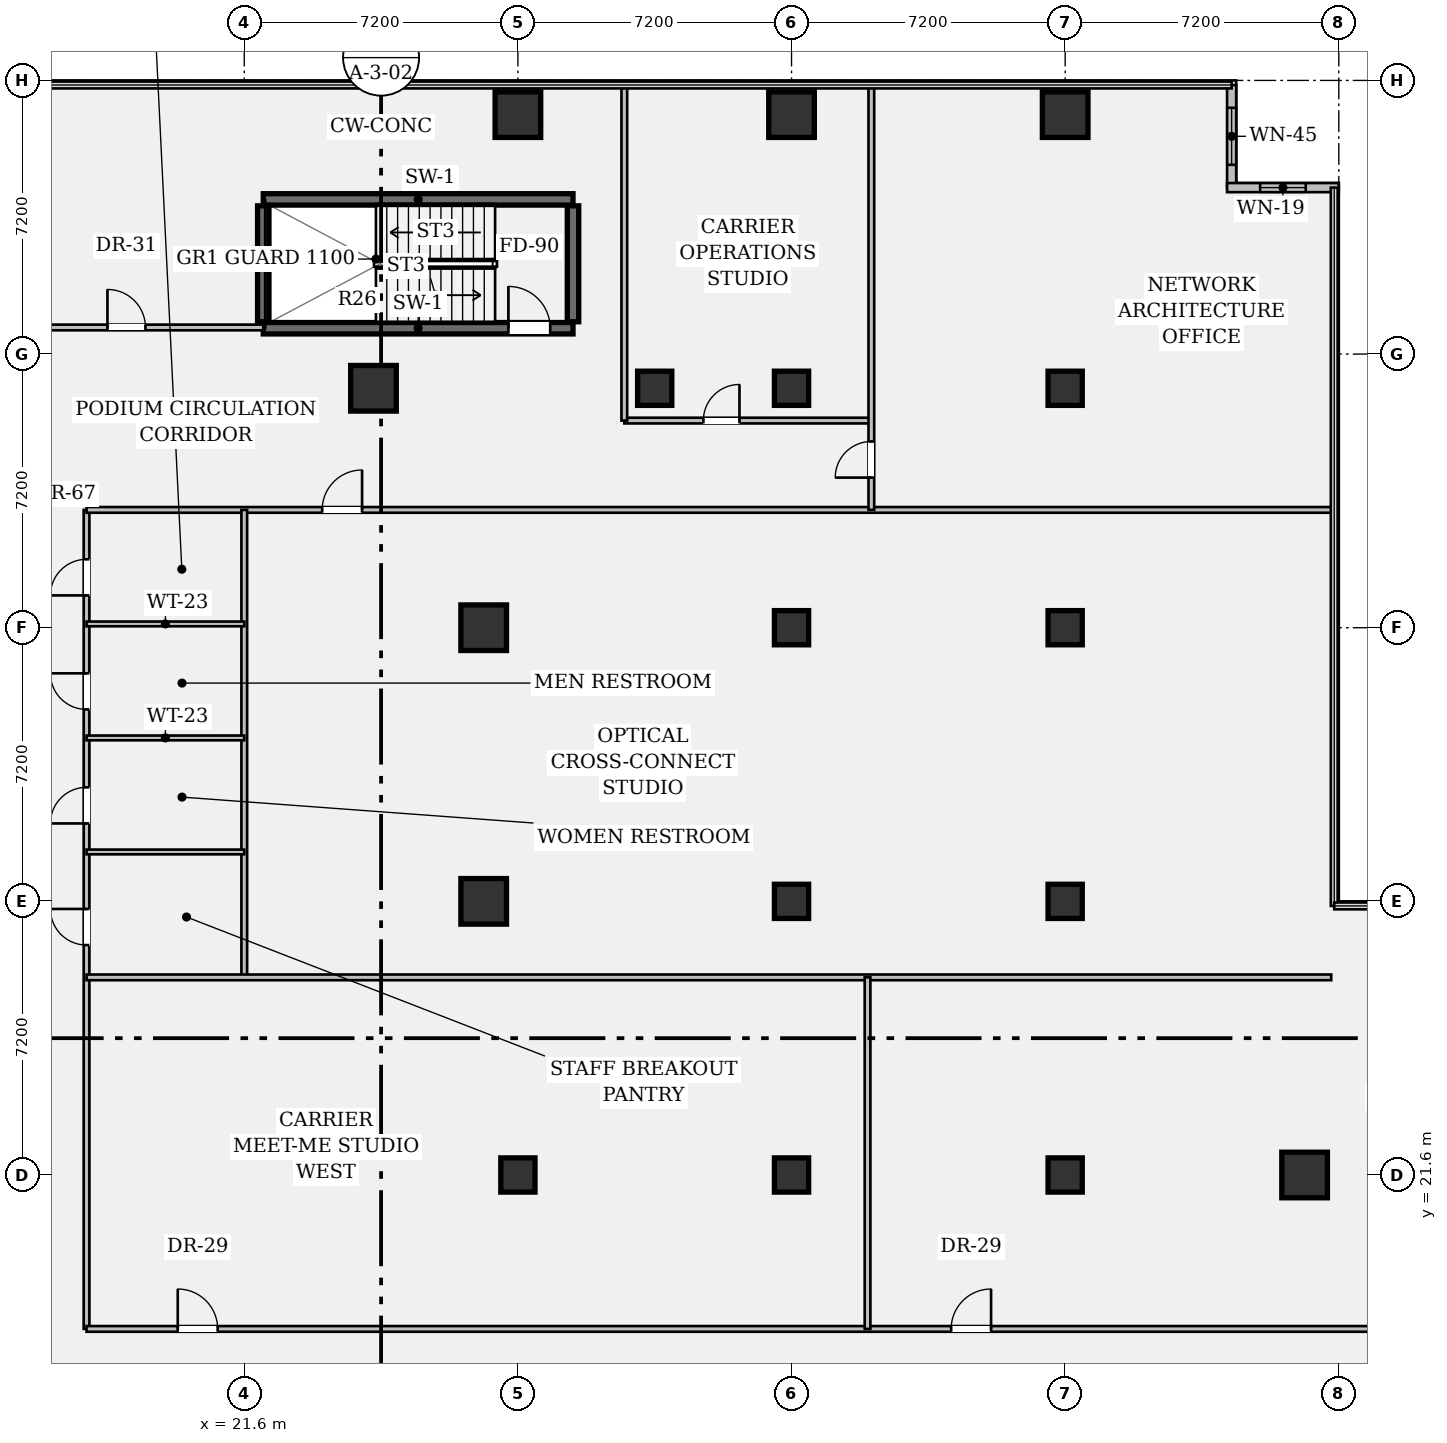
"""IFC4 building model, lengths in metres.
Left out: names, types, materials, properties, quantities, classifications, styles, units other than length and angle.
Written with IfcOpenShell. Run it as: python <this file> out.ifc"""

import sys

from ifc_helpers import new_model, si_unit, direction, frame, frame_2d, origin, origin_2d, place, context, subcontext, project, spatial, rectangle, hollow_rectangle, extrude, element, fill, save


model = new_model("IFC4")
c1 = context("Model", 3, precision=1e-05, world=origin(), true_north=direction((0.0, 1.0)))
c2 = subcontext(c1, "Body", "Model", "MODEL_VIEW")
j1 = project(units=[si_unit("LENGTHUNIT", "METRE"), si_unit("PLANEANGLEUNIT", "RADIAN")], contexts=[c1])
p1 = place(None, origin())
s1 = spatial("IfcSite", under=j1, at=p1, CompositionType="ELEMENT")
p2 = place(p1, origin())
s2 = spatial("IfcBuilding", under=s1, at=p2, CompositionType="ELEMENT")
p3 = place(p2, frame((0.0, 0.0, 9.45)))
s3 = spatial("IfcBuildingStorey", under=s2, at=p3, CompositionType="ELEMENT", Elevation=9.45)
p4 = place(p3, frame((22.1, 43.88, 0.0), z_axis=(0.0, 0.0, 1.0), x_axis=(1.0, 0.0, 0.0)))
e1 = element("IfcWall", 1, at=p4, inside=s3, PredefinedType="SHEAR", context=c2, shape_type="SweptSolid", body=[
    extrude(rectangle(XDim=8.15, YDim=0.3, at=frame_2d((4.075, 0.0))), origin(), (0.0, 0.0, 1.0), 3.9),
])
p5 = place(p4, frame((6.45, 0.0, 0.0)))
e2 = element("IfcOpeningElement", 2, at=p5, cuts=e1, PredefinedType="OPENING", context=c2, shape_type="SweptSolid", body=[
    extrude(rectangle(XDim=1.1, YDim=2.15, at=frame_2d((0.55, 1.075))), frame((0.0, 0.162, 0.0), z_axis=(0.0, -1.0, 0.0), x_axis=(1.0, 0.0, 0.0)), (0.0, 0.0, 1.0), 0.324),
])
p6 = place(p3, frame((22.1, 47.27, 0.0), z_axis=(0.0, 0.0, 1.0), x_axis=(1.0, 0.0, 0.0)))
e3 = element("IfcWall", 3, at=p6, inside=s3, PredefinedType="SHEAR", context=c2, shape_type="SweptSolid", body=[
    extrude(rectangle(XDim=8.15, YDim=0.3, at=frame_2d((4.075, 0.0))), origin(), (0.0, 0.0, 1.0), 3.9),
])
for number, where, z_axis, x_axis in (
    (4, (22.1, 44.05, 0.0), (0.0, 0.0, 1.0), (0.0, 1.0, 0.0)),
    (5, (30.25, 44.05, 0.0), (0.0, 0.0, 1.0), (0.0, 1.0, 0.0)),
):
    element("IfcWall", number, at=place(p3, frame(where, z_axis=z_axis, x_axis=x_axis)), inside=s3, PredefinedType="SHEAR", context=c2, shape_type="SweptSolid", body=[
        extrude(rectangle(XDim=3.05, YDim=0.3, at=frame_2d((1.525, 0.0))), origin(), (0.0, 0.0, 1.0), 3.9),
    ])
for number, where, z_axis, x_axis in (
    (6, (25.0, 42.3, 0.0), (0.0, 0.0, 1.0), (1.0, 0.0, 0.0)),
    (7, (27.9, 28.8, 0.0), (0.0, 0.0, 1.0), (1.0, 0.0, 0.0)),
    (8, (27.9, 36.0, 0.0), (0.0, 0.0, 1.0), (1.0, 0.0, 0.0)),
):
    element("IfcColumn", number, at=place(p3, frame(where, z_axis=z_axis, x_axis=x_axis)), inside=s3, PredefinedType="COLUMN", context=c2, shape_type="SweptSolid", body=[
        extrude(hollow_rectangle(XDim=1.2, YDim=1.2, WallThickness=0.075, at=origin_2d()), origin(), (0.0, 0.0, 1.0), 3.9),
    ])
p7 = place(p3, frame((28.8, 21.6, 0.0), z_axis=(0.0, 0.0, 1.0), x_axis=(1.0, 0.0, 0.0)))
e9 = element("IfcColumn", 9, at=p7, inside=s3, PredefinedType="COLUMN", context=c2, shape_type="SweptSolid", body=[
    extrude(rectangle(XDim=0.9, YDim=0.9, at=origin_2d()), origin(), (0.0, 0.0, 1.0), 3.9),
])
p8 = place(p3, frame((28.8, 49.5, 0.0), z_axis=(0.0, 0.0, 1.0), x_axis=(1.0, 0.0, 0.0)))
e10 = element("IfcColumn", 10, at=p8, inside=s3, PredefinedType="COLUMN", context=c2, shape_type="SweptSolid", body=[
    extrude(hollow_rectangle(XDim=1.2, YDim=1.2, WallThickness=0.075, at=origin_2d()), origin(), (0.0, 0.0, 1.0), 3.9),
])
for number, where, z_axis, x_axis in (
    (11, (32.4, 42.3, 0.0), (0.0, 0.0, 1.0), (1.0, 0.0, 0.0)),
    (12, (36.0, 21.6, 0.0), (0.0, 0.0, 1.0), (1.0, 0.0, 0.0)),
    (13, (36.0, 28.8, 0.0), (0.0, 0.0, 1.0), (1.0, 0.0, 0.0)),
    (14, (36.0, 36.0, 0.0), (0.0, 0.0, 1.0), (1.0, 0.0, 0.0)),
    (15, (36.0, 42.3, 0.0), (0.0, 0.0, 1.0), (1.0, 0.0, 0.0)),
):
    element("IfcColumn", number, at=place(p3, frame(where, z_axis=z_axis, x_axis=x_axis)), inside=s3, PredefinedType="COLUMN", context=c2, shape_type="SweptSolid", body=[
        extrude(rectangle(XDim=0.9, YDim=0.9, at=origin_2d()), origin(), (0.0, 0.0, 1.0), 3.9),
    ])
p9 = place(p3, frame((36.0, 49.5, 0.0), z_axis=(0.0, 0.0, 1.0), x_axis=(1.0, 0.0, 0.0)))
e16 = element("IfcColumn", 16, at=p9, inside=s3, PredefinedType="COLUMN", context=c2, shape_type="SweptSolid", body=[
    extrude(hollow_rectangle(XDim=1.2, YDim=1.2, WallThickness=0.075, at=origin_2d()), origin(), (0.0, 0.0, 1.0), 3.9),
])
for number, where, z_axis, x_axis in (
    (17, (43.2, 21.6, 0.0), (0.0, 0.0, 1.0), (1.0, 0.0, 0.0)),
    (18, (43.2, 28.8, 0.0), (0.0, 0.0, 1.0), (1.0, 0.0, 0.0)),
    (19, (43.2, 36.0, 0.0), (0.0, 0.0, 1.0), (1.0, 0.0, 0.0)),
    (20, (43.2, 42.3, 0.0), (0.0, 0.0, 1.0), (1.0, 0.0, 0.0)),
):
    element("IfcColumn", number, at=place(p3, frame(where, z_axis=z_axis, x_axis=x_axis)), inside=s3, PredefinedType="COLUMN", context=c2, shape_type="SweptSolid", body=[
        extrude(rectangle(XDim=0.9, YDim=0.9, at=origin_2d()), origin(), (0.0, 0.0, 1.0), 3.9),
    ])
for number, where, z_axis, x_axis in (
    (21, (43.2, 49.5, 0.0), (0.0, 0.0, 1.0), (1.0, 0.0, 0.0)),
    (22, (49.5, 21.6, 0.0), (0.0, 0.0, 1.0), (1.0, 0.0, 0.0)),
):
    element("IfcColumn", number, at=place(p3, frame(where, z_axis=z_axis, x_axis=x_axis)), inside=s3, PredefinedType="COLUMN", context=c2, shape_type="SweptSolid", body=[
        extrude(hollow_rectangle(XDim=1.2, YDim=1.2, WallThickness=0.075, at=origin_2d()), origin(), (0.0, 0.0, 1.0), 3.9),
    ])
p10 = place(p3, frame((47.58, 50.28, 0.0), z_axis=(0.0, 0.0, 1.0), x_axis=(0.0, -1.0, 0.0)))
e23 = element("IfcWall", 23, at=p10, inside=s3, PredefinedType="STANDARD", context=c2, shape_type="SweptSolid", body=[
    extrude(rectangle(XDim=2.7, YDim=0.24, at=frame_2d((1.35, 0.0))), origin(), (0.0, 0.0, 1.0), 3.9),
])
p11 = place(p10, frame((0.6, 0.0, 0.95)))
e24 = element("IfcOpeningElement", 24, at=p11, cuts=e23, PredefinedType="OPENING", context=c2, shape_type="SweptSolid", body=[
    extrude(rectangle(XDim=1.5, YDim=1.8, at=frame_2d((0.75, 0.9))), frame((0.0, 0.132, 0.0), z_axis=(0.0, -1.0, 0.0), x_axis=(1.0, 0.0, 0.0)), (0.0, 0.0, 1.0), 0.264),
])
p12 = place(p3, frame((47.46, 47.58, 0.0), z_axis=(0.0, 0.0, 1.0), x_axis=(1.0, 0.0, 0.0)))
e25 = element("IfcWall", 25, at=p12, inside=s3, PredefinedType="STANDARD", context=c2, shape_type="SweptSolid", body=[
    extrude(rectangle(XDim=2.94, YDim=0.24, at=frame_2d((1.47, 0.0))), origin(), (0.0, 0.0, 1.0), 3.9),
])
p13 = place(p12, frame((0.87, 0.0, 0.95)))
e26 = element("IfcOpeningElement", 26, at=p13, cuts=e25, PredefinedType="OPENING", context=c2, shape_type="SweptSolid", body=[
    extrude(rectangle(XDim=1.2, YDim=1.8, at=frame_2d((0.6, 0.9))), frame((0.0, 0.132, 0.0), z_axis=(0.0, -1.0, 0.0), x_axis=(1.0, 0.0, 0.0)), (0.0, 0.0, 1.0), 0.264),
])
p14 = place(p3, frame((17.45, 17.55, 0.0), z_axis=(0.0, 0.0, 1.0), x_axis=(0.0, 1.0, 0.0)))
e27 = element("IfcWall", 27, at=p14, inside=s3, PredefinedType="PARTITIONING", context=c2, shape_type="SweptSolid", body=[
    extrude(rectangle(XDim=21.55, YDim=0.15, at=frame_2d((10.775, 0.0))), origin(), (0.0, 0.0, 1.0), 2.938),
])
p15 = place(p14, frame((19.3, 0.0, 0.0)))
e28 = element("IfcOpeningElement", 28, at=p15, cuts=e27, PredefinedType="OPENING", context=c2, shape_type="SweptSolid", body=[
    extrude(rectangle(XDim=0.95, YDim=2.15, at=frame_2d((0.475, 1.075))), frame((0.0, 0.087, 0.0), z_axis=(0.0, -1.0, 0.0), x_axis=(1.0, 0.0, 0.0)), (0.0, 0.0, 1.0), 0.174),
])
p16 = place(p14, frame((16.3, 0.0, 0.0)))
e29 = element("IfcOpeningElement", 29, at=p16, cuts=e27, PredefinedType="OPENING", context=c2, shape_type="SweptSolid", body=[
    extrude(rectangle(XDim=0.95, YDim=2.15, at=frame_2d((0.475, 1.075))), frame((0.0, 0.087, 0.0), z_axis=(0.0, -1.0, 0.0), x_axis=(1.0, 0.0, 0.0)), (0.0, 0.0, 1.0), 0.174),
])
p17 = place(p14, frame((13.3, 0.0, 0.0)))
e30 = element("IfcOpeningElement", 30, at=p17, cuts=e27, PredefinedType="OPENING", context=c2, shape_type="SweptSolid", body=[
    extrude(rectangle(XDim=0.95, YDim=2.15, at=frame_2d((0.475, 1.075))), frame((0.0, 0.087, 0.0), z_axis=(0.0, -1.0, 0.0), x_axis=(1.0, 0.0, 0.0)), (0.0, 0.0, 1.0), 0.174),
])
p18 = place(p14, frame((10.1, 0.0, 0.0)))
e31 = element("IfcOpeningElement", 31, at=p18, cuts=e27, PredefinedType="OPENING", context=c2, shape_type="SweptSolid", body=[
    extrude(rectangle(XDim=0.95, YDim=2.15, at=frame_2d((0.475, 1.075))), frame((0.0, 0.087, 0.0), z_axis=(0.0, -1.0, 0.0), x_axis=(1.0, 0.0, 0.0)), (0.0, 0.0, 1.0), 0.174),
])
p19 = place(p3, frame((14.4, 43.9, 0.0), z_axis=(0.0, 0.0, 1.0), x_axis=(1.0, 0.0, 0.0)))
e32 = element("IfcWall", 32, at=p19, inside=s3, PredefinedType="PARTITIONING", context=c2, shape_type="SweptSolid", body=[
    extrude(rectangle(XDim=7.7, YDim=0.15, at=frame_2d((3.85, 0.0))), origin(), (0.0, 0.0, 1.0), 2.938),
])
p20 = place(p19, frame((3.6, 0.0, 0.0)))
e33 = element("IfcOpeningElement", 33, at=p20, cuts=e32, PredefinedType="OPENING", context=c2, shape_type="SweptSolid", body=[
    extrude(rectangle(XDim=1.0, YDim=2.15, at=frame_2d((0.5, 1.075))), frame((0.0, 0.087, 0.0), z_axis=(0.0, -1.0, 0.0), x_axis=(1.0, 0.0, 0.0)), (0.0, 0.0, 1.0), 0.174),
])
p21 = place(p3, frame((31.6, 41.45, 0.0), z_axis=(0.0, 0.0, 1.0), x_axis=(1.0, 0.0, 0.0)))
e34 = element("IfcWall", 34, at=p21, inside=s3, PredefinedType="PARTITIONING", context=c2, shape_type="SweptSolid", body=[
    extrude(rectangle(XDim=6.5, YDim=0.15, at=frame_2d((3.25, 0.0))), origin(), (0.0, 0.0, 1.0), 2.938),
])
p22 = place(p21, frame((2.08, 0.0, 0.0)))
e35 = element("IfcOpeningElement", 35, at=p22, cuts=e34, PredefinedType="OPENING", context=c2, shape_type="SweptSolid", body=[
    extrude(rectangle(XDim=0.95, YDim=2.15, at=frame_2d((0.475, 1.075))), frame((0.0, 0.087, 0.0), z_axis=(0.0, -1.0, 0.0), x_axis=(1.0, 0.0, 0.0)), (0.0, 0.0, 1.0), 0.174),
])
p23 = place(p3, frame((17.45, 39.1, 0.0), z_axis=(0.0, 0.0, 1.0), x_axis=(1.0, 0.0, 0.0)))
e36 = element("IfcWall", 36, at=p23, inside=s3, PredefinedType="PARTITIONING", context=c2, shape_type="SweptSolid", body=[
    extrude(rectangle(XDim=32.83, YDim=0.15, at=frame_2d((16.415, 0.0))), origin(), (0.0, 0.0, 1.0), 2.938),
])
p24 = place(p23, frame((6.2, 0.0, 0.0)))
e37 = element("IfcOpeningElement", 37, at=p24, cuts=e36, PredefinedType="OPENING", context=c2, shape_type="SweptSolid", body=[
    extrude(rectangle(XDim=1.05, YDim=2.15, at=frame_2d((0.525, 1.075))), frame((0.0, 0.087, 0.0), z_axis=(0.0, -1.0, 0.0), x_axis=(1.0, 0.0, 0.0)), (0.0, 0.0, 1.0), 0.174),
])
p25 = place(p3, frame((31.6, 41.45, 0.0), z_axis=(0.0, 0.0, 1.0), x_axis=(0.0, 1.0, 0.0)))
e38 = element("IfcWall", 38, at=p25, inside=s3, PredefinedType="PARTITIONING", context=c2, shape_type="SweptSolid", body=[
    extrude(rectangle(XDim=8.83, YDim=0.15, at=frame_2d((4.415, 0.0))), origin(), (0.0, 0.0, 1.0), 2.938),
])
p26 = place(p3, frame((38.1, 39.1, 0.0), z_axis=(0.0, 0.0, 1.0), x_axis=(0.0, 1.0, 0.0)))
e39 = element("IfcWall", 39, at=p26, inside=s3, PredefinedType="PARTITIONING", context=c2, shape_type="SweptSolid", body=[
    extrude(rectangle(XDim=11.18, YDim=0.15, at=frame_2d((5.59, 0.0))), origin(), (0.0, 0.0, 1.0), 2.938),
])
p27 = place(p26, frame((0.85, 0.0, 0.0)))
e40 = element("IfcOpeningElement", 40, at=p27, cuts=e39, PredefinedType="OPENING", context=c2, shape_type="SweptSolid", body=[
    extrude(rectangle(XDim=0.95, YDim=2.15, at=frame_2d((0.475, 1.075))), frame((0.0, 0.087, 0.0), z_axis=(0.0, -1.0, 0.0), x_axis=(1.0, 0.0, 0.0)), (0.0, 0.0, 1.0), 0.174),
])
p28 = place(p3, frame((17.45, 17.55, 0.0), z_axis=(0.0, 0.0, 1.0), x_axis=(1.0, 0.0, 0.0)))
e41 = element("IfcWall", 41, at=p28, inside=s3, PredefinedType="PARTITIONING", context=c2, shape_type="SweptSolid", body=[
    extrude(rectangle(XDim=68.83, YDim=0.15, at=frame_2d((34.415, 0.0))), origin(), (0.0, 0.0, 1.0), 2.938),
])
p29 = place(p28, frame((2.4, 0.0, 0.0)))
e42 = element("IfcOpeningElement", 42, at=p29, cuts=e41, PredefinedType="OPENING", context=c2, shape_type="SweptSolid", body=[
    extrude(rectangle(XDim=1.05, YDim=2.15, at=frame_2d((0.525, 1.075))), frame((0.0, 0.087, 0.0), z_axis=(0.0, -1.0, 0.0), x_axis=(1.0, 0.0, 0.0)), (0.0, 0.0, 1.0), 0.174),
])
p30 = place(p28, frame((22.75, 0.0, 0.0)))
e43 = element("IfcOpeningElement", 43, at=p30, cuts=e41, PredefinedType="OPENING", context=c2, shape_type="SweptSolid", body=[
    extrude(rectangle(XDim=1.05, YDim=2.15, at=frame_2d((0.525, 1.075))), frame((0.0, 0.087, 0.0), z_axis=(0.0, -1.0, 0.0), x_axis=(1.0, 0.0, 0.0)), (0.0, 0.0, 1.0), 0.174),
])
p31 = place(p28, frame((46.75, 0.0, 0.0)))
e44 = element("IfcOpeningElement", 44, at=p31, cuts=e41, PredefinedType="OPENING", context=c2, shape_type="SweptSolid", body=[
    extrude(rectangle(XDim=1.05, YDim=2.15, at=frame_2d((0.525, 1.075))), frame((0.0, 0.087, 0.0), z_axis=(0.0, -1.0, 0.0), x_axis=(1.0, 0.0, 0.0)), (0.0, 0.0, 1.0), 0.174),
])
p32 = place(p3, frame((21.6, 26.8, 0.0), z_axis=(0.0, 0.0, 1.0), x_axis=(0.0, 1.0, 0.0)))
e45 = element("IfcWall", 45, at=p32, inside=s3, PredefinedType="PARTITIONING", context=c2, shape_type="SweptSolid", body=[
    extrude(rectangle(XDim=12.3, YDim=0.15, at=frame_2d((6.15, 0.0))), origin(), (0.0, 0.0, 1.0), 2.938),
])
p33 = place(p3, frame((17.45, 36.1, 0.0), z_axis=(0.0, 0.0, 1.0), x_axis=(1.0, 0.0, 0.0)))
e46 = element("IfcWall", 46, at=p33, inside=s3, PredefinedType="PARTITIONING", context=c2, shape_type="SweptSolid", body=[
    extrude(rectangle(XDim=4.15, YDim=0.125, at=frame_2d((2.075, 0.0))), origin(), (0.0, 0.0, 1.0), 2.938),
])
for number, where, z_axis, x_axis in (
    (47, (17.45, 33.1, 0.0), (0.0, 0.0, 1.0), (1.0, 0.0, 0.0)),
    (48, (17.45, 30.1, 0.0), (0.0, 0.0, 1.0), (1.0, 0.0, 0.0)),
):
    element("IfcWall", number, at=place(p3, frame(where, z_axis=z_axis, x_axis=x_axis)), inside=s3, PredefinedType="PARTITIONING", context=c2, shape_type="SweptSolid", body=[
        extrude(rectangle(XDim=4.15, YDim=0.125, at=frame_2d((2.075, 0.0))), origin(), (0.0, 0.0, 1.0), 3.336),
    ])
p34 = place(p3, frame((17.45, 26.8, 0.0), z_axis=(0.0, 0.0, 1.0), x_axis=(1.0, 0.0, 0.0)))
e49 = element("IfcWall", 49, at=p34, inside=s3, PredefinedType="PARTITIONING", context=c2, shape_type="SweptSolid", body=[
    extrude(rectangle(XDim=32.75, YDim=0.15, at=frame_2d((16.375, 0.0))), origin(), (0.0, 0.0, 1.0), 2.938),
])
p35 = place(p3, frame((38.0, 17.55, 0.0), z_axis=(0.0, 0.0, 1.0), x_axis=(0.0, 1.0, 0.0)))
e50 = element("IfcWall", 50, at=p35, inside=s3, PredefinedType="PARTITIONING", context=c2, shape_type="SweptSolid", body=[
    extrude(rectangle(XDim=9.25, YDim=0.15, at=frame_2d((4.625, 0.0))), origin(), (0.0, 0.0, 1.0), 2.938),
])
p36 = place(p11, origin())
e51 = element("IfcWindow", 51, at=p36, inside=s3, PartitioningType="SINGLE_PANEL", PredefinedType="WINDOW", context=c2, shape_type="SweptSolid", body=[
    extrude(rectangle(XDim=1.5, YDim=1.8, at=frame_2d((0.75, 0.9))), frame((0.0, 0.03, 0.0), z_axis=(0.0, -1.0, 0.0), x_axis=(1.0, 0.0, 0.0)), (0.0, 0.0, 1.0), 0.06),
])
fill(e24, e51)
p37 = place(p13, origin())
e52 = element("IfcWindow", 52, at=p37, inside=s3, PartitioningType="SINGLE_PANEL", PredefinedType="WINDOW", context=c2, shape_type="SweptSolid", body=[
    extrude(rectangle(XDim=1.2, YDim=1.8, at=frame_2d((0.6, 0.9))), frame((0.0, 0.03, 0.0), z_axis=(0.0, -1.0, 0.0), x_axis=(1.0, 0.0, 0.0)), (0.0, 0.0, 1.0), 0.06),
])
fill(e26, e52)
p38 = place(p5, origin())
e53 = element("IfcDoor", 53, at=p38, inside=s3, OperationType="SINGLE_SWING_LEFT", PredefinedType="DOOR", context=c2, shape_type="SweptSolid", body=[
    extrude(rectangle(XDim=1.1, YDim=2.15, at=frame_2d((0.55, 1.075))), frame((0.0, 0.025, 0.0), z_axis=(0.0, -1.0, 0.0), x_axis=(1.0, 0.0, 0.0)), (0.0, 0.0, 1.0), 0.05),
])
fill(e2, e53)
p39 = place(p15, origin())
e54 = element("IfcDoor", 54, at=p39, inside=s3, OperationType="SINGLE_SWING_LEFT", PredefinedType="DOOR", context=c2, shape_type="SweptSolid", body=[
    extrude(rectangle(XDim=0.95, YDim=2.15, at=frame_2d((0.475, 1.075))), frame((0.0, 0.025, 0.0), z_axis=(0.0, -1.0, 0.0), x_axis=(1.0, 0.0, 0.0)), (0.0, 0.0, 1.0), 0.05),
])
fill(e28, e54)
p40 = place(p16, origin())
e55 = element("IfcDoor", 55, at=p40, inside=s3, OperationType="SINGLE_SWING_RIGHT", PredefinedType="DOOR", context=c2, shape_type="SweptSolid", body=[
    extrude(rectangle(XDim=0.95, YDim=2.15, at=frame_2d((0.475, 1.075))), frame((0.0, 0.025, 0.0), z_axis=(0.0, -1.0, 0.0), x_axis=(1.0, 0.0, 0.0)), (0.0, 0.0, 1.0), 0.05),
])
fill(e29, e55)
p41 = place(p17, origin())
e56 = element("IfcDoor", 56, at=p41, inside=s3, OperationType="SINGLE_SWING_LEFT", PredefinedType="DOOR", context=c2, shape_type="SweptSolid", body=[
    extrude(rectangle(XDim=0.95, YDim=2.15, at=frame_2d((0.475, 1.075))), frame((0.0, 0.025, 0.0), z_axis=(0.0, -1.0, 0.0), x_axis=(1.0, 0.0, 0.0)), (0.0, 0.0, 1.0), 0.05),
])
fill(e30, e56)
p42 = place(p18, origin())
e57 = element("IfcDoor", 57, at=p42, inside=s3, OperationType="SINGLE_SWING_RIGHT", PredefinedType="DOOR", context=c2, shape_type="SweptSolid", body=[
    extrude(rectangle(XDim=0.95, YDim=2.15, at=frame_2d((0.475, 1.075))), frame((0.0, 0.025, 0.0), z_axis=(0.0, -1.0, 0.0), x_axis=(1.0, 0.0, 0.0)), (0.0, 0.0, 1.0), 0.05),
])
fill(e31, e57)
p43 = place(p22, origin())
e58 = element("IfcDoor", 58, at=p43, inside=s3, OperationType="SINGLE_SWING_RIGHT", PredefinedType="DOOR", context=c2, shape_type="SweptSolid", body=[
    extrude(rectangle(XDim=0.95, YDim=2.15, at=frame_2d((0.475, 1.075))), frame((0.0, 0.025, 0.0), z_axis=(0.0, -1.0, 0.0), x_axis=(1.0, 0.0, 0.0)), (0.0, 0.0, 1.0), 0.05),
])
fill(e35, e58)
p44 = place(p29, origin())
e59 = element("IfcDoor", 59, at=p44, inside=s3, OperationType="SINGLE_SWING_LEFT", PredefinedType="DOOR", context=c2, shape_type="SweptSolid", body=[
    extrude(rectangle(XDim=1.05, YDim=2.15, at=frame_2d((0.525, 1.075))), frame((0.0, 0.025, 0.0), z_axis=(0.0, -1.0, 0.0), x_axis=(1.0, 0.0, 0.0)), (0.0, 0.0, 1.0), 0.05),
])
fill(e42, e59)
p45 = place(p30, origin())
e60 = element("IfcDoor", 60, at=p45, inside=s3, OperationType="SINGLE_SWING_RIGHT", PredefinedType="DOOR", context=c2, shape_type="SweptSolid", body=[
    extrude(rectangle(XDim=1.05, YDim=2.15, at=frame_2d((0.525, 1.075))), frame((0.0, 0.025, 0.0), z_axis=(0.0, -1.0, 0.0), x_axis=(1.0, 0.0, 0.0)), (0.0, 0.0, 1.0), 0.05),
])
fill(e43, e60)
p46 = place(p24, origin())
e61 = element("IfcDoor", 61, at=p46, inside=s3, OperationType="SINGLE_SWING_RIGHT", PredefinedType="DOOR", context=c2, shape_type="SweptSolid", body=[
    extrude(rectangle(XDim=1.05, YDim=2.15, at=frame_2d((0.525, 1.075))), frame((0.0, 0.025, 0.0), z_axis=(0.0, -1.0, 0.0), x_axis=(1.0, 0.0, 0.0)), (0.0, 0.0, 1.0), 0.05),
])
fill(e37, e61)
p47 = place(p27, origin())
e62 = element("IfcDoor", 62, at=p47, inside=s3, OperationType="SINGLE_SWING_LEFT", PredefinedType="DOOR", context=c2, shape_type="SweptSolid", body=[
    extrude(rectangle(XDim=0.95, YDim=2.15, at=frame_2d((0.475, 1.075))), frame((0.0, 0.025, 0.0), z_axis=(0.0, -1.0, 0.0), x_axis=(1.0, 0.0, 0.0)), (0.0, 0.0, 1.0), 0.05),
])
fill(e40, e62)
p48 = place(p20, origin())
e63 = element("IfcDoor", 63, at=p48, inside=s3, OperationType="SINGLE_SWING_LEFT", PredefinedType="DOOR", context=c2, shape_type="SweptSolid", body=[
    extrude(rectangle(XDim=1.0, YDim=2.15, at=frame_2d((0.5, 1.075))), frame((0.0, 0.025, 0.0), z_axis=(0.0, -1.0, 0.0), x_axis=(1.0, 0.0, 0.0)), (0.0, 0.0, 1.0), 0.05),
])
fill(e33, e63)
save(model, sys.argv[1])
